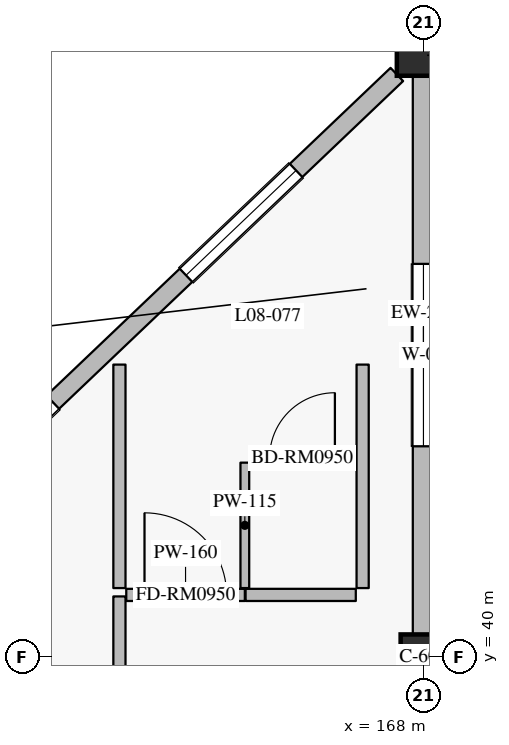
"""IFC4 building model, lengths in metres.
Left out: names, types, materials, properties, quantities, classifications, styles, units other than length and angle.
Written with IfcOpenShell. Run it as: python <this file> out.ifc"""

import sys

from ifc_helpers import new_model, si_unit, direction, frame, frame_2d, origin, origin_2d, place, context, subcontext, project, spatial, rectangle, extrude, element, fill, save


model = new_model("IFC4")
c1 = context("Model", 3, precision=1e-05, world=origin(), true_north=direction((0.0, 1.0)))
c2 = subcontext(c1, "Body", "Model", "MODEL_VIEW")
j1 = project(units=[si_unit("LENGTHUNIT", "METRE"), si_unit("PLANEANGLEUNIT", "RADIAN")], contexts=[c1])
p1 = place(None, origin())
s1 = spatial("IfcSite", under=j1, at=p1, CompositionType="ELEMENT")
p2 = place(p1, origin())
s2 = spatial("IfcBuilding", under=s1, at=p2, CompositionType="ELEMENT")
p3 = place(p2, frame((0.0, 0.0, 36.0)))
s3 = spatial("IfcBuildingStorey", under=s2, at=p3, CompositionType="ELEMENT", Elevation=36.0)
p4 = place(p3, frame((168.0, 48.0, 0.0), z_axis=(0.0, 0.0, 1.0), x_axis=(1.0, 0.0, 0.0)))
e1 = element("IfcColumn", 1, at=p4, inside=s3, PredefinedType="COLUMN", context=c2, shape_type="SweptSolid", body=[
    extrude(rectangle(XDim=0.7, YDim=0.7, at=origin_2d()), origin(), (0.0, 0.0, 1.0), 3.6),
])
p5 = place(p3, frame((168.0, 40.0, 0.0), z_axis=(0.0, 0.0, 1.0), x_axis=(1.0, 0.0, 0.0)))
e2 = element("IfcColumn", 2, at=p5, inside=s3, PredefinedType="COLUMN", context=c2, shape_type="SweptSolid", body=[
    extrude(rectangle(XDim=0.6, YDim=0.6, at=origin_2d()), origin(), (0.0, 0.0, 1.0), 3.6),
])
p6 = place(p3, frame((159.95, 40.333, 0.0), z_axis=(0.0, 0.0, 1.0), x_axis=(0.724105170588, 0.689689569247, 0.0)))
e3 = element("IfcWall", 3, at=p6, inside=s3, PredefinedType="SOLIDWALL", context=c2, shape_type="SweptSolid", body=[
    extrude(rectangle(XDim=10.634, YDim=0.24, at=frame_2d((5.317, 0.0))), origin(), (0.0, 0.0, 1.0), 2.94),
])
p7 = place(p6, frame((2.383, 0.0, 0.8)))
e4 = element("IfcOpeningElement", 4, at=p7, cuts=e3, PredefinedType="OPENING", context=c2, shape_type="SweptSolid", body=[
    extrude(rectangle(XDim=2.0, YDim=1.75, at=frame_2d((1.0, 0.875))), frame((0.0, 0.13, 0.0), z_axis=(0.0, -1.0, 0.0), x_axis=(1.0, 0.0, 0.0)), (0.0, 0.0, 1.0), 0.26),
])
p8 = place(p6, frame((6.803, 0.0, 0.8)))
e5 = element("IfcOpeningElement", 5, at=p8, cuts=e3, PredefinedType="OPENING", context=c2, shape_type="SweptSolid", body=[
    extrude(rectangle(XDim=2.0, YDim=1.75, at=frame_2d((1.0, 0.875))), frame((0.0, 0.13, 0.0), z_axis=(0.0, -1.0, 0.0), x_axis=(1.0, 0.0, 0.0)), (0.0, 0.0, 1.0), 0.26),
])
p9 = place(p3, frame((168.0, 47.65, 0.0), z_axis=(0.0, 0.0, 1.0), x_axis=(0.0, -1.0, 0.0)))
e6 = element("IfcWall", 6, at=p9, inside=s3, PredefinedType="SOLIDWALL", context=c2, shape_type="SweptSolid", body=[
    extrude(rectangle(XDim=7.35, YDim=0.28, at=frame_2d((3.675, 0.0))), origin(), (0.0, 0.0, 1.0), 2.7),
])
p10 = place(p9, frame((2.475, 0.0, 0.5)))
e7 = element("IfcOpeningElement", 7, at=p10, cuts=e6, PredefinedType="OPENING", context=c2, shape_type="SweptSolid", body=[
    extrude(rectangle(XDim=2.4, YDim=1.65, at=frame_2d((1.2, 0.825))), frame((0.0, 0.15, 0.0), z_axis=(0.0, -1.0, 0.0), x_axis=(1.0, 0.0, 0.0)), (0.0, 0.0, 1.0), 0.3),
])
p11 = place(p3, frame((164.0, 32.26, 0.0), z_axis=(0.0, 0.0, 1.0), x_axis=(0.0, 1.0, 0.0)))
e8 = element("IfcWall", 8, at=p11, inside=s3, PredefinedType="PARTITIONING", context=c2, shape_type="SweptSolid", body=[
    extrude(rectangle(XDim=8.54, YDim=0.16, at=frame_2d((4.27, 0.0))), origin(), (0.0, 0.0, 1.0), 3.365),
])
p12 = place(p3, frame((164.09, 40.82, 0.0), z_axis=(0.0, 0.0, 1.0), x_axis=(1.0, 0.0, 0.0)))
e9 = element("IfcWall", 9, at=p12, inside=s3, PredefinedType="PARTITIONING", context=c2, shape_type="SweptSolid", body=[
    extrude(rectangle(XDim=1.56, YDim=0.16, at=frame_2d((0.78, 0.0))), origin(), (0.0, 0.0, 1.0), 3.365),
])
p13 = place(p12, frame((0.24, 0.0, 0.0)))
e10 = element("IfcOpeningElement", 10, at=p13, cuts=e9, PredefinedType="OPENING", context=c2, shape_type="SweptSolid", body=[
    extrude(rectangle(XDim=1.08, YDim=2.3, at=frame_2d((0.54, 1.15))), frame((0.0, 0.09, 0.0), z_axis=(0.0, -1.0, 0.0), x_axis=(1.0, 0.0, 0.0)), (0.0, 0.0, 1.0), 0.18),
])
p14 = place(p3, frame((165.66, 40.82, 0.0), z_axis=(0.0, 0.0, 1.0), x_axis=(1.0, 0.0, 0.0)))
e11 = element("IfcWall", 11, at=p14, inside=s3, PredefinedType="PARTITIONING", context=c2, shape_type="SweptSolid", body=[
    extrude(rectangle(XDim=1.45, YDim=0.16, at=frame_2d((0.725, 0.0))), origin(), (0.0, 0.0, 1.0), 3.365),
])
p15 = place(p3, frame((165.65, 40.91, 0.0), z_axis=(0.0, 0.0, 1.0), x_axis=(0.0, 1.0, 0.0)))
e12 = element("IfcWall", 12, at=p15, inside=s3, PredefinedType="PARTITIONING", context=c2, shape_type="SweptSolid", body=[
    extrude(rectangle(XDim=1.65, YDim=0.115, at=frame_2d((0.825, 0.0))), origin(), (0.0, 0.0, 1.0), 3.365),
])
p16 = place(p3, frame((165.71, 42.62, 0.0), z_axis=(0.0, 0.0, 1.0), x_axis=(1.0, 0.0, 0.0)))
e13 = element("IfcWall", 13, at=p16, inside=s3, PredefinedType="PARTITIONING", context=c2, shape_type="SweptSolid", body=[
    extrude(rectangle(XDim=1.39, YDim=0.115, at=frame_2d((0.695, 0.0))), origin(), (0.0, 0.0, 1.0), 3.365),
])
p17 = place(p16, frame((0.265, 0.0, 0.0)))
e14 = element("IfcOpeningElement", 14, at=p17, cuts=e13, PredefinedType="OPENING", context=c2, shape_type="SweptSolid", body=[
    extrude(rectangle(XDim=0.86, YDim=2.12, at=frame_2d((0.43, 1.06))), frame((0.0, 0.067, 0.0), z_axis=(0.0, -1.0, 0.0), x_axis=(1.0, 0.0, 0.0)), (0.0, 0.0, 1.0), 0.135),
])
for number, where, z_axis, x_axis in (
    (15, (164.0, 40.91, 0.0), (0.0, 0.0, 1.0), (0.0, 1.0, 0.0)),
    (16, (167.2, 40.91, 0.0), (0.0, 0.0, 1.0), (0.0, 1.0, 0.0)),
):
    element("IfcWall", number, at=place(p3, frame(where, z_axis=z_axis, x_axis=x_axis)), inside=s3, PredefinedType="PARTITIONING", context=c2, shape_type="SweptSolid", body=[
        extrude(rectangle(XDim=2.94, YDim=0.16, at=frame_2d((1.47, 0.0))), origin(), (0.0, 0.0, 1.0), 3.365),
    ])
p18 = place(p7, origin())
e17 = element("IfcWindow", 17, at=p18, inside=s3, PartitioningType="DOUBLE_PANEL_VERTICAL", PredefinedType="WINDOW", context=c2, shape_type="SweptSolid", body=[
    extrude(rectangle(XDim=2.0, YDim=1.75, at=frame_2d((1.0, 0.875))), frame((0.0, 0.03, 0.0), z_axis=(0.0, -1.0, 0.0), x_axis=(1.0, 0.0, 0.0)), (0.0, 0.0, 1.0), 0.06),
])
fill(e4, e17)
p19 = place(p8, origin())
e18 = element("IfcWindow", 18, at=p19, inside=s3, PartitioningType="DOUBLE_PANEL_VERTICAL", PredefinedType="WINDOW", context=c2, shape_type="SweptSolid", body=[
    extrude(rectangle(XDim=2.0, YDim=1.75, at=frame_2d((1.0, 0.875))), frame((0.0, 0.03, 0.0), z_axis=(0.0, -1.0, 0.0), x_axis=(1.0, 0.0, 0.0)), (0.0, 0.0, 1.0), 0.06),
])
fill(e5, e18)
p20 = place(p10, origin())
e19 = element("IfcWindow", 19, at=p20, inside=s3, PartitioningType="DOUBLE_PANEL_VERTICAL", PredefinedType="WINDOW", context=c2, shape_type="SweptSolid", body=[
    extrude(rectangle(XDim=2.4, YDim=1.65, at=frame_2d((1.2, 0.825))), frame((0.0, 0.03, 0.0), z_axis=(0.0, -1.0, 0.0), x_axis=(1.0, 0.0, 0.0)), (0.0, 0.0, 1.0), 0.06),
])
fill(e7, e19)
p21 = place(p13, origin())
e20 = element("IfcDoor", 20, at=p21, inside=s3, OperationType="SINGLE_SWING_LEFT", PredefinedType="DOOR", context=c2, shape_type="SweptSolid", body=[
    extrude(rectangle(XDim=1.08, YDim=2.3, at=frame_2d((0.54, 1.15))), frame((0.0, 0.025, 0.0), z_axis=(0.0, -1.0, 0.0), x_axis=(1.0, 0.0, 0.0)), (0.0, 0.0, 1.0), 0.05),
])
fill(e10, e20)
p22 = place(p17, origin())
e21 = element("IfcDoor", 21, at=p22, inside=s3, OperationType="SINGLE_SWING_RIGHT", PredefinedType="DOOR", context=c2, shape_type="SweptSolid", body=[
    extrude(rectangle(XDim=0.86, YDim=2.12, at=frame_2d((0.43, 1.06))), frame((0.0, 0.025, 0.0), z_axis=(0.0, -1.0, 0.0), x_axis=(1.0, 0.0, 0.0)), (0.0, 0.0, 1.0), 0.05),
])
fill(e14, e21)
save(model, sys.argv[1])
